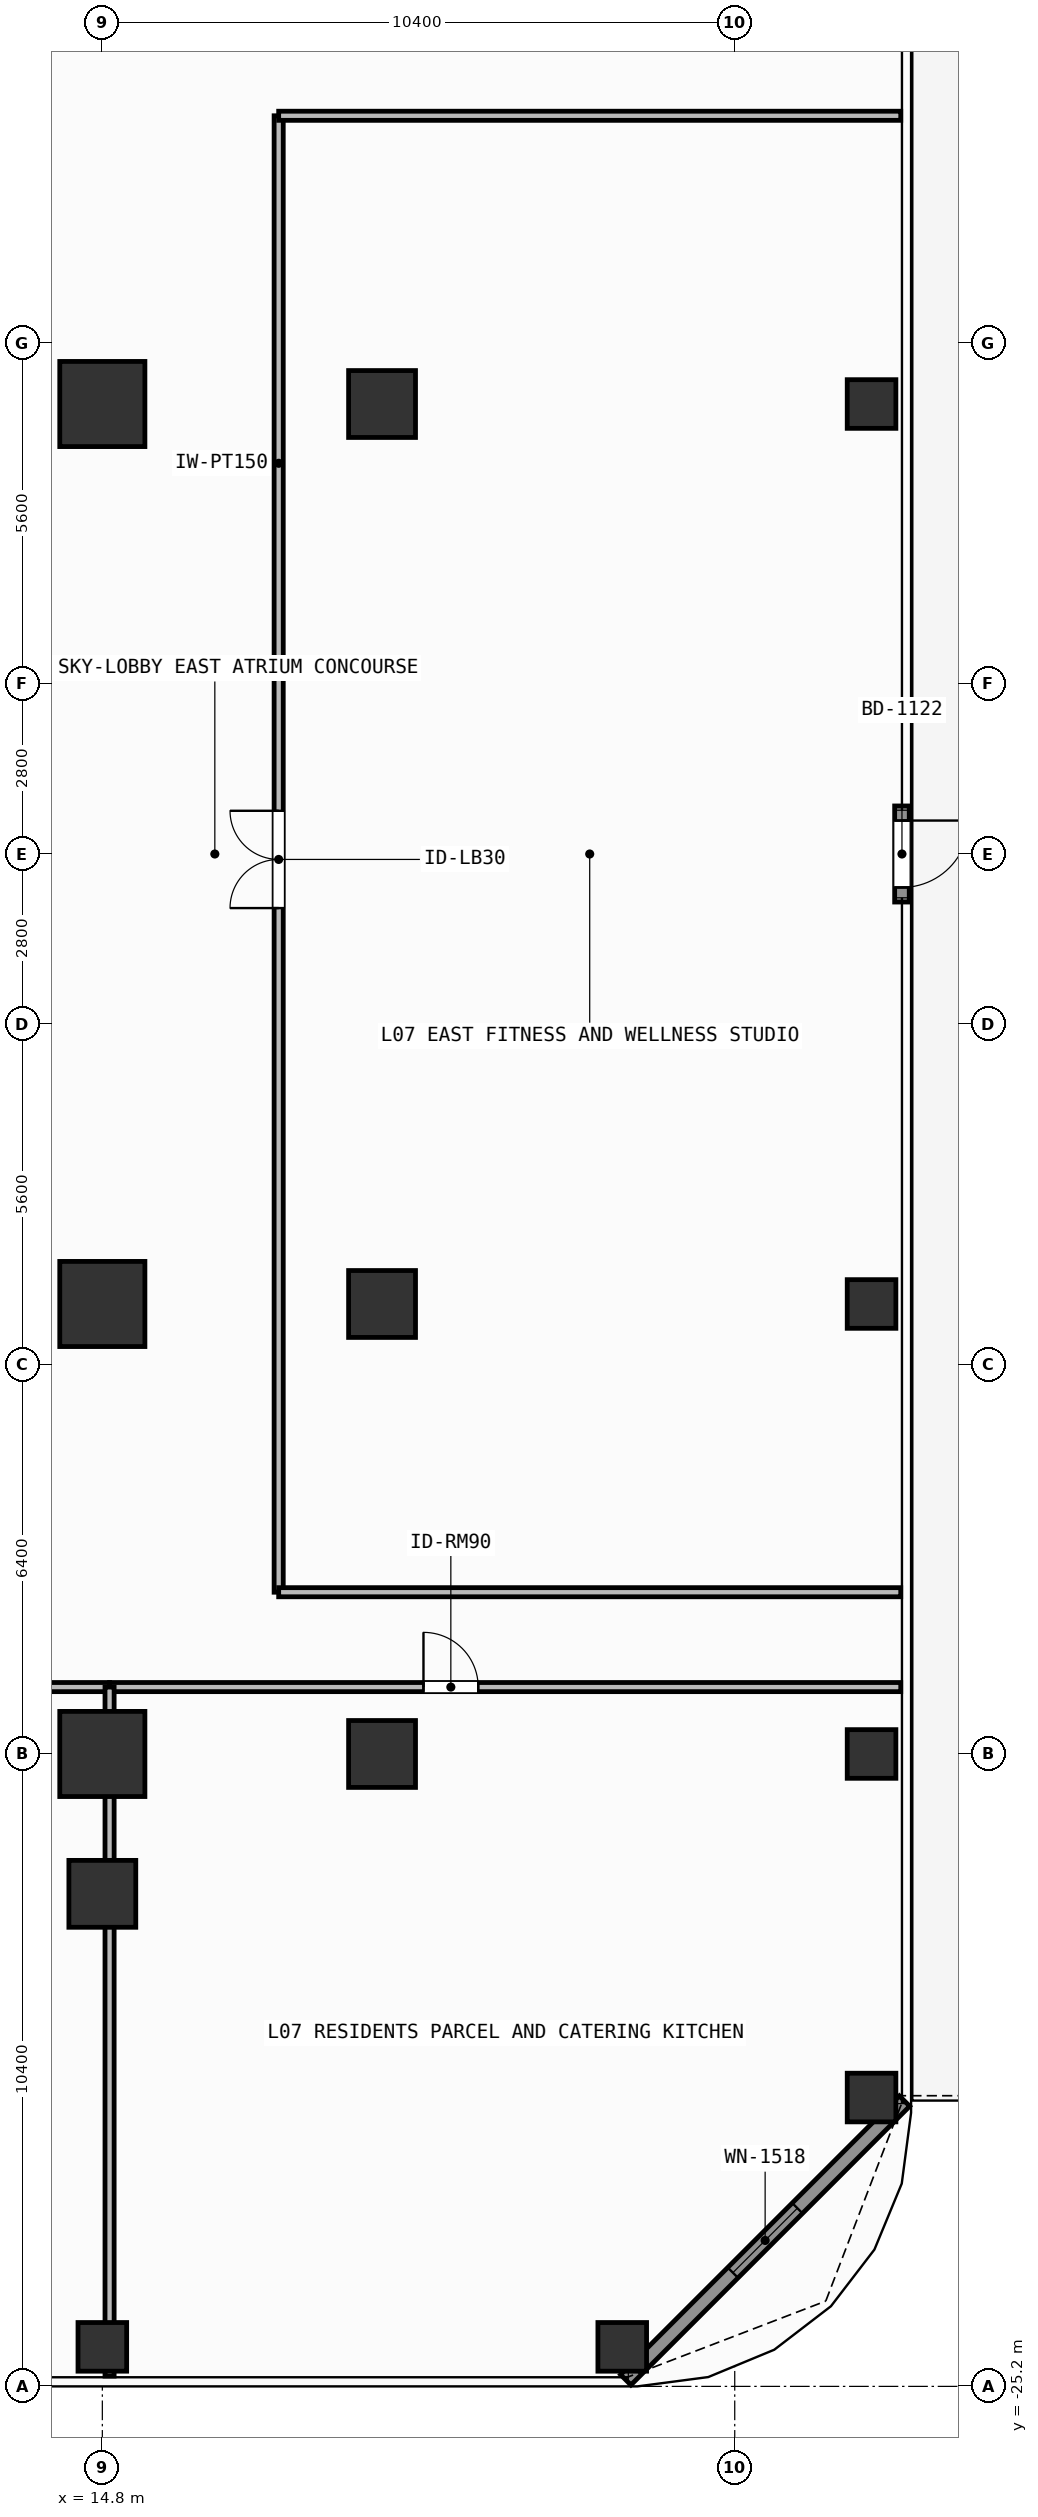
"""IFC4 building model, lengths in metres.
Left out: names, types, materials, properties, quantities, classifications, styles, units other than length and angle.
Written with IfcOpenShell. Run it as: python <this file> out.ifc"""

import sys

from ifc_helpers import new_model, si_unit, direction, frame, frame_2d, origin, origin_2d, place, context, subcontext, project, spatial, rectangle, hollow_rectangle, extrude, element, fill, save


model = new_model("IFC4")
c1 = context("Model", 3, precision=1e-05, world=origin(), true_north=direction((0.0, 1.0)))
c2 = subcontext(c1, "Body", "Model", "MODEL_VIEW")
j1 = project(units=[si_unit("LENGTHUNIT", "METRE"), si_unit("PLANEANGLEUNIT", "RADIAN")], contexts=[c1])
p1 = place(None, origin())
s1 = spatial("IfcSite", under=j1, at=p1, CompositionType="ELEMENT")
p2 = place(p1, origin())
s2 = spatial("IfcBuilding", under=s1, at=p2, CompositionType="ELEMENT")
p3 = place(p2, frame((0.0, 0.0, 26.4)))
s3 = spatial("IfcBuildingStorey", under=s2, at=p3, CompositionType="ELEMENT", Elevation=26.4)
for number, where, z_axis, x_axis in (
    (1, (14.8, -14.8, 0.0), (0.0, 0.0, 1.0), (1.0, 0.0, 0.0)),
    (2, (14.8, -7.4, 0.0), (0.0, 0.0, 1.0), (1.0, 0.0, 0.0)),
    (3, (14.8, 7.4, 0.0), (0.0, 0.0, 1.0), (1.0, 0.0, 0.0)),
):
    element("IfcColumn", number, at=place(p3, frame(where, z_axis=z_axis, x_axis=x_axis)), inside=s3, PredefinedType="COLUMN", context=c2, shape_type="SweptSolid", body=[
        extrude(rectangle(XDim=1.4, YDim=1.4, at=origin_2d()), origin(), (0.0, 0.0, 1.0), 4.2),
    ])
for number, where, z_axis, x_axis in (
    (4, (19.4, -14.8, 0.0), (0.0, 0.0, 1.0), (1.0, 0.0, 0.0)),
    (5, (19.4, -7.4, 0.0), (0.0, 0.0, 1.0), (1.0, 0.0, 0.0)),
    (6, (19.4, 7.4, 0.0), (0.0, 0.0, 1.0), (1.0, 0.0, 0.0)),
    (7, (14.8, -17.1, 0.0), (0.0, 0.0, 1.0), (1.0, 0.0, 0.0)),
):
    element("IfcColumn", number, at=place(p3, frame(where, z_axis=z_axis, x_axis=x_axis)), inside=s3, PredefinedType="COLUMN", context=c2, shape_type="SweptSolid", body=[
        extrude(rectangle(XDim=1.1, YDim=1.1, at=origin_2d()), origin(), (0.0, 0.0, 1.0), 4.2),
    ])
for number, where, z_axis, x_axis in (
    (8, (23.35, -24.55, 0.0), (0.0, 0.0, 1.0), (1.0, 0.0, 0.0)),
    (9, (27.45, -20.45, 0.0), (0.0, 0.0, 1.0), (1.0, 0.0, 0.0)),
    (10, (14.8, -24.55, 0.0), (0.0, 0.0, 1.0), (1.0, 0.0, 0.0)),
    (11, (27.45, -14.8, 0.0), (0.0, 0.0, 1.0), (1.0, 0.0, 0.0)),
    (12, (27.45, -7.4, 0.0), (0.0, 0.0, 1.0), (1.0, 0.0, 0.0)),
    (13, (27.45, 7.4, 0.0), (0.0, 0.0, 1.0), (1.0, 0.0, 0.0)),
):
    element("IfcColumn", number, at=place(p3, frame(where, z_axis=z_axis, x_axis=x_axis)), inside=s3, PredefinedType="COLUMN", context=c2, shape_type="SweptSolid", body=[
        extrude(hollow_rectangle(XDim=0.8, YDim=0.8, WallThickness=0.036, at=origin_2d()), origin(), (0.0, 0.0, 1.0), 4.2),
    ])
p4 = place(p3, frame((27.95, 0.79, 0.0), z_axis=(0.0, 0.0, 1.0), x_axis=(0.0, -1.0, 0.0)))
e14 = element("IfcWall", 14, at=p4, inside=s3, PredefinedType="SOLIDWALL", context=c2, shape_type="SweptSolid", body=[
    extrude(rectangle(XDim=1.58, YDim=0.24, at=frame_2d((0.79, 0.0))), origin(), (0.0, 0.0, 1.0), 3.98),
])
p5 = place(p4, frame((0.24, 0.0, 0.0)))
e15 = element("IfcOpeningElement", 15, at=p5, cuts=e14, PredefinedType="OPENING", context=c2, shape_type="SweptSolid", body=[
    extrude(rectangle(XDim=1.1, YDim=2.2, at=frame_2d((0.55, 1.1))), frame((0.0, 0.13, 0.0), z_axis=(0.0, -1.0, 0.0), x_axis=(1.0, 0.0, 0.0)), (0.0, 0.0, 1.0), 0.26),
])
p6 = place(p3, frame((27.992, -20.508, 0.0), z_axis=(0.0, 0.0, 1.0), x_axis=(-0.707106781187, -0.707106781187, 0.0)))
e16 = element("IfcWall", 16, at=p6, inside=s3, PredefinedType="SOLIDWALL", context=c2, shape_type="SweptSolid", body=[
    extrude(rectangle(XDim=6.484, YDim=0.24, at=frame_2d((3.242, 0.0))), origin(), (0.0, 0.0, 1.0), 3.98),
])
p7 = place(p6, frame((2.492, 0.0, 0.8)))
e17 = element("IfcOpeningElement", 17, at=p7, cuts=e16, PredefinedType="OPENING", context=c2, shape_type="SweptSolid", body=[
    extrude(rectangle(XDim=1.5, YDim=1.85, at=frame_2d((0.75, 0.925))), frame((0.0, 0.13, 0.0), z_axis=(0.0, -1.0, 0.0), x_axis=(1.0, 0.0, 0.0)), (0.0, 0.0, 1.0), 0.26),
])
p8 = place(p3, frame((-0.105, -13.7, 0.0), z_axis=(0.0, 0.0, 1.0), x_axis=(1.0, 0.0, 0.0)))
e18 = element("IfcWall", 18, at=p8, inside=s3, PredefinedType="PARTITIONING", context=c2, shape_type="SweptSolid", body=[
    extrude(rectangle(XDim=15.024, YDim=0.15, at=frame_2d((7.512, 0.0))), origin(), (0.0, 0.0, 1.0), 3.98),
])
p9 = place(p8, frame((5.718, 0.0, 0.0)))
e19 = element("IfcOpeningElement", 19, at=p9, cuts=e18, PredefinedType="OPENING", context=c2, shape_type="SweptSolid", body=[
    extrude(rectangle(XDim=0.9, YDim=2.1, at=frame_2d((0.45, 1.05))), frame((0.0, 0.085, 0.0), z_axis=(0.0, -1.0, 0.0), x_axis=(1.0, 0.0, 0.0)), (0.0, 0.0, 1.0), 0.17),
])
p10 = place(p3, frame((14.919, -13.7, 0.0), z_axis=(0.0, 0.0, 1.0), x_axis=(1.0, 0.0, 0.0)))
e20 = element("IfcWall", 20, at=p10, inside=s3, PredefinedType="PARTITIONING", context=c2, shape_type="SweptSolid", body=[
    extrude(rectangle(XDim=13.011, YDim=0.15, at=frame_2d((6.505, 0.0))), origin(), (0.0, 0.0, 1.0), 3.98),
])
p11 = place(p10, frame((5.162, 0.0, 0.0)))
e21 = element("IfcOpeningElement", 21, at=p11, cuts=e20, PredefinedType="OPENING", context=c2, shape_type="SweptSolid", body=[
    extrude(rectangle(XDim=0.9, YDim=2.1, at=frame_2d((0.45, 1.05))), frame((0.0, 0.085, 0.0), z_axis=(0.0, -1.0, 0.0), x_axis=(1.0, 0.0, 0.0)), (0.0, 0.0, 1.0), 0.17),
])
p12 = place(p3, frame((17.7, -12.14, 0.0), z_axis=(0.0, 0.0, 1.0), x_axis=(0.0, 1.0, 0.0)))
e22 = element("IfcWall", 22, at=p12, inside=s3, PredefinedType="PARTITIONING", context=c2, shape_type="SweptSolid", body=[
    extrude(rectangle(XDim=24.28, YDim=0.15, at=frame_2d((12.14, 0.0))), origin(), (0.0, 0.0, 1.0), 3.98),
])
p13 = place(p12, frame((11.25, 0.0, 0.0)))
e23 = element("IfcOpeningElement", 23, at=p13, cuts=e22, PredefinedType="OPENING", context=c2, shape_type="SweptSolid", body=[
    extrude(rectangle(XDim=1.6, YDim=2.3, at=frame_2d((0.8, 1.15))), frame((0.0, 0.085, 0.0), z_axis=(0.0, -1.0, 0.0), x_axis=(1.0, 0.0, 0.0)), (0.0, 0.0, 1.0), 0.17),
])
p14 = place(p3, frame((14.919, -25.03, 0.0), z_axis=(0.0, 0.0, 1.0), x_axis=(0.0, 1.0, 0.0)))
e24 = element("IfcWall", 24, at=p14, inside=s3, PredefinedType="PARTITIONING", context=c2, shape_type="SweptSolid", body=[
    extrude(rectangle(XDim=11.33, YDim=0.15, at=frame_2d((5.665, 0.0))), origin(), (0.0, 0.0, 1.0), 3.382),
])
for number, where, z_axis, x_axis in (
    (25, (17.7, -12.14, 0.0), (0.0, 0.0, 1.0), (1.0, 0.0, 0.0)),
    (26, (17.7, 12.14, 0.0), (0.0, 0.0, 1.0), (1.0, 0.0, 0.0)),
):
    element("IfcWall", number, at=place(p3, frame(where, z_axis=z_axis, x_axis=x_axis)), inside=s3, PredefinedType="PARTITIONING", context=c2, shape_type="SweptSolid", body=[
        extrude(rectangle(XDim=10.23, YDim=0.15, at=frame_2d((5.115, 0.0))), origin(), (0.0, 0.0, 1.0), 3.98),
    ])
p15 = place(p5, origin())
e27 = element("IfcDoor", 27, at=p15, inside=s3, OperationType="SINGLE_SWING_LEFT", PredefinedType="DOOR", context=c2, shape_type="SweptSolid", body=[
    extrude(rectangle(XDim=1.1, YDim=2.2, at=frame_2d((0.55, 1.1))), frame((0.0, 0.025, 0.0), z_axis=(0.0, -1.0, 0.0), x_axis=(1.0, 0.0, 0.0)), (0.0, 0.0, 1.0), 0.05),
])
fill(e15, e27)
p16 = place(p7, origin())
e28 = element("IfcWindow", 28, at=p16, inside=s3, PartitioningType="SINGLE_PANEL", PredefinedType="WINDOW", context=c2, shape_type="SweptSolid", body=[
    extrude(rectangle(XDim=1.5, YDim=1.85, at=frame_2d((0.75, 0.925))), frame((0.0, 0.03, 0.0), z_axis=(0.0, -1.0, 0.0), x_axis=(1.0, 0.0, 0.0)), (0.0, 0.0, 1.0), 0.06),
])
fill(e17, e28)
p17 = place(p11, origin())
e29 = element("IfcDoor", 29, at=p17, inside=s3, OperationType="SINGLE_SWING_LEFT", PredefinedType="DOOR", context=c2, shape_type="SweptSolid", body=[
    extrude(rectangle(XDim=0.9, YDim=2.1, at=frame_2d((0.45, 1.05))), frame((0.0, 0.025, 0.0), z_axis=(0.0, -1.0, 0.0), x_axis=(1.0, 0.0, 0.0)), (0.0, 0.0, 1.0), 0.05),
])
fill(e21, e29)
p18 = place(p13, origin())
e30 = element("IfcDoor", 30, at=p18, inside=s3, OperationType="SINGLE_SWING_LEFT", PredefinedType="DOOR", context=c2, shape_type="SweptSolid", body=[
    extrude(rectangle(XDim=1.6, YDim=2.3, at=frame_2d((0.8, 1.15))), frame((0.0, 0.025, 0.0), z_axis=(0.0, -1.0, 0.0), x_axis=(1.0, 0.0, 0.0)), (0.0, 0.0, 1.0), 0.05),
])
fill(e23, e30)
save(model, sys.argv[1])
